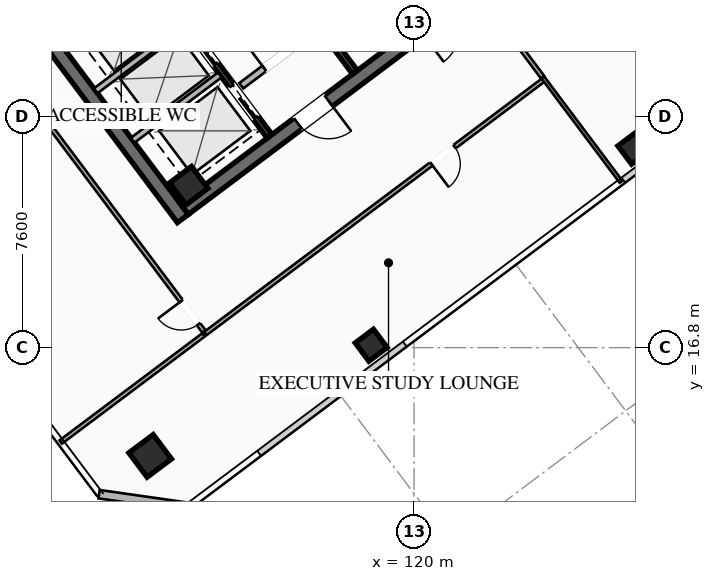
"""IFC4 building model, lengths in metres.
Left out: names, types, materials, properties, quantities, classifications, styles, units other than length and angle.
Written with IfcOpenShell. Run it as: python <this file> out.ifc"""

import sys

from ifc_helpers import new_model, si_unit, direction, frame, frame_2d, origin, origin_2d, place, context, subcontext, project, spatial, rectangle, hollow_rectangle, extrude, element, fill, save


model = new_model("IFC4")
c1 = context("Model", 3, precision=1e-05, world=origin(), true_north=direction((0.0, 1.0)))
c2 = subcontext(c1, "Body", "Model", "MODEL_VIEW")
j1 = project(units=[si_unit("LENGTHUNIT", "METRE"), si_unit("PLANEANGLEUNIT", "RADIAN")], contexts=[c1])
p1 = place(None, origin())
s1 = spatial("IfcSite", under=j1, at=p1, CompositionType="ELEMENT")
p2 = place(p1, origin())
s2 = spatial("IfcBuilding", under=s1, at=p2, CompositionType="ELEMENT")
p3 = place(p2, frame((0.0, 0.0, 218.4)))
s3 = spatial("IfcBuildingStorey", under=s2, at=p3, CompositionType="ELEMENT", Elevation=218.4)
p4 = place(p3, frame((112.396, 21.047, 0.0), z_axis=(0.0, 0.0, 1.0), x_axis=(-0.600005007985, 0.799996243986, 0.0)))
e1 = element("IfcWall", 1, at=p4, inside=s3, PredefinedType="SHEAR", context=c2, shape_type="SweptSolid", body=[
    extrude(rectangle(XDim=15.6, YDim=0.45, at=frame_2d((7.8, 0.0))), origin(), (0.0, 0.0, 1.0), 3.55),
])
p5 = place(p3, frame((124.649, 30.518, 0.0), z_axis=(0.0, 0.0, 1.0), x_axis=(-0.8, -0.6, 0.0)))
e2 = element("IfcWall", 2, at=p5, inside=s3, PredefinedType="SHEAR", context=c2, shape_type="SweptSolid", body=[
    extrude(rectangle(XDim=15.26, YDim=0.45, at=frame_2d((7.63, 0.0))), origin(), (0.0, 0.0, 1.0), 3.55),
])
p6 = place(p5, frame((9.33, 0.0, 0.0)))
e3 = element("IfcOpeningElement", 3, at=p6, cuts=e2, PredefinedType="OPENING", context=c2, shape_type="SweptSolid", body=[
    extrude(rectangle(XDim=1.25, YDim=2.25, at=frame_2d((0.625, 1.125))), frame((0.0, 0.235, 0.0), z_axis=(0.0, -1.0, 0.0), x_axis=(1.0, 0.0, 0.0)), (0.0, 0.0, 1.0), 0.47),
])
p7 = place(p5, frame((4.28, 0.0, 0.0)))
e4 = element("IfcOpeningElement", 4, at=p7, cuts=e2, PredefinedType="OPENING", context=c2, shape_type="SweptSolid", body=[
    extrude(rectangle(XDim=1.25, YDim=2.25, at=frame_2d((0.625, 1.125))), frame((0.0, 0.235, 0.0), z_axis=(0.0, -1.0, 0.0), x_axis=(1.0, 0.0, 0.0)), (0.0, 0.0, 1.0), 0.47),
])
p8 = place(p3, frame((112.59, 22.13, 0.0), z_axis=(0.0, 0.0, 1.0), x_axis=(0.799999996291, 0.600000004945, 0.0)))
e5 = element("IfcColumn", 5, at=p8, inside=s3, PredefinedType="COLUMN", context=c2, shape_type="SweptSolid", body=[
    extrude(hollow_rectangle(XDim=0.9, YDim=0.9, WallThickness=0.04, at=origin_2d()), origin(), (0.0, 0.0, 1.0), 3.37),
])
p9 = place(p3, frame((111.32, 13.24, 0.0), z_axis=(0.0, 0.0, 1.0), x_axis=(0.799999996291, 0.600000004945, 0.0)))
e6 = element("IfcColumn", 6, at=p9, inside=s3, PredefinedType="COLUMN", context=c2, shape_type="SweptSolid", body=[
    extrude(hollow_rectangle(XDim=1.0, YDim=1.0, WallThickness=0.04, at=origin_2d()), origin(), (0.0, 0.0, 1.0), 3.37),
])
for number, where, z_axis, x_axis in (
    (7, (118.59, 16.88, 0.0), (0.0, 0.0, 1.0), (0.8, 0.6, 0.0)),
    (8, (127.23, 23.36, 0.0), (0.0, 0.0, 1.0), (0.8, 0.6, 0.0)),
):
    element("IfcColumn", number, at=place(p3, frame(where, z_axis=z_axis, x_axis=x_axis)), inside=s3, PredefinedType="COLUMN", context=c2, shape_type="SweptSolid", body=[
        extrude(hollow_rectangle(XDim=0.75, YDim=0.75, WallThickness=0.032, at=origin_2d()), origin(), (0.0, 0.0, 1.0), 3.37),
    ])
p10 = place(p3, frame((112.58, 11.56, 0.0), z_axis=(0.0, 0.0, 1.0), x_axis=(-0.989954425158, 0.14138683146, 0.0)))
e9 = element("IfcWall", 9, at=p10, inside=s3, PredefinedType="SOLIDWALL", context=c2, shape_type="SweptSolid", body=[
    extrude(rectangle(XDim=2.97, YDim=0.28, at=frame_2d((1.485, 0.0))), origin(), (0.0, 0.0, 1.0), 3.37),
])
p11 = place(p3, frame((118.058, 25.856, 0.0), z_axis=(0.0, 0.0, 1.0), x_axis=(-0.600002657301, 0.799998007018, 0.0)))
e10 = element("IfcWall", 10, at=p11, inside=s3, PredefinedType="SHEAR", context=c2, shape_type="SweptSolid", body=[
    extrude(rectangle(XDim=14.7, YDim=0.2, at=frame_2d((7.35, 0.0))), origin(), (0.0, 0.0, 1.0), 3.37),
])
p12 = place(p3, frame((114.316, 25.412, 0.0), z_axis=(0.0, 0.0, 1.0), x_axis=(0.800018601094, 0.59997519774, 0.0)))
e11 = element("IfcWall", 11, at=p12, inside=s3, PredefinedType="SOLIDWALL", context=c2, shape_type="SweptSolid", body=[
    extrude(rectangle(XDim=3.15, YDim=0.22, at=frame_2d((1.575, 0.0))), origin(), (0.0, 0.0, 1.0), 2.723),
])
p13 = place(p12, frame((0.95, 0.0, 0.0)))
e12 = element("IfcOpeningElement", 12, at=p13, cuts=e11, PredefinedType="OPENING", context=c2, shape_type="SweptSolid", body=[
    extrude(rectangle(XDim=1.25, YDim=2.25, at=frame_2d((0.625, 1.125))), frame((0.0, 0.12, 0.0), z_axis=(0.0, -1.0, 0.0), x_axis=(1.0, 0.0, 0.0)), (0.0, 0.0, 1.0), 0.24),
])
p14 = place(p3, frame((115.25, 23.75, 0.0), z_axis=(0.0, 0.0, 1.0), x_axis=(-0.599994036198, 0.800004472816, 0.0)))
e13 = element("IfcWall", 13, at=p14, inside=s3, PredefinedType="SHEAR", context=c2, shape_type="SweptSolid", body=[
    extrude(rectangle(XDim=6.55, YDim=0.2, at=frame_2d((3.275, 0.0))), origin(), (0.0, 0.0, 1.0), 3.37),
])
p15 = place(p14, frame((4.975, 0.0, 0.0)))
e14 = element("IfcOpeningElement", 14, at=p15, cuts=e13, PredefinedType="OPENING", context=c2, shape_type="SweptSolid", body=[
    extrude(rectangle(XDim=1.3, YDim=2.25, at=frame_2d((0.65, 1.125))), frame((0.0, 0.11, 0.0), z_axis=(0.0, -1.0, 0.0), x_axis=(1.0, 0.0, 0.0)), (0.0, 0.0, 1.0), 0.22),
])
p16 = place(p14, frame((2.975, 0.0, 0.0)))
e15 = element("IfcOpeningElement", 15, at=p16, cuts=e13, PredefinedType="OPENING", context=c2, shape_type="SweptSolid", body=[
    extrude(rectangle(XDim=1.3, YDim=2.25, at=frame_2d((0.65, 1.125))), frame((0.0, 0.11, 0.0), z_axis=(0.0, -1.0, 0.0), x_axis=(1.0, 0.0, 0.0)), (0.0, 0.0, 1.0), 0.22),
])
p17 = place(p14, frame((0.775, 0.0, 0.0)))
e16 = element("IfcOpeningElement", 16, at=p17, cuts=e13, PredefinedType="OPENING", context=c2, shape_type="SweptSolid", body=[
    extrude(rectangle(XDim=1.3, YDim=2.25, at=frame_2d((0.65, 1.125))), frame((0.0, 0.11, 0.0), z_axis=(0.0, -1.0, 0.0), x_axis=(1.0, 0.0, 0.0)), (0.0, 0.0, 1.0), 0.22),
])
for number, where, z_axis, x_axis in (
    (17, (110.746, 23.622, 0.0), (0.0, 0.0, 1.0), (0.8, 0.6, 0.0)),
    (18, (109.528, 25.246, 0.0), (0.0, 0.0, 1.0), (0.8, 0.6, 0.0)),
):
    element("IfcWall", number, at=place(p3, frame(where, z_axis=z_axis, x_axis=x_axis)), inside=s3, PredefinedType="SOLIDWALL", context=c2, shape_type="SweptSolid", body=[
        extrude(rectangle(XDim=3.58, YDim=0.2, at=frame_2d((1.79, 0.0))), origin(), (0.0, 0.0, 1.0), 3.37),
    ])
p18 = place(p3, frame((124.282, 25.624, 0.0), z_axis=(0.0, 0.0, 1.0), x_axis=(-0.800004206286, -0.599994391578, 0.0)))
e19 = element("IfcWall", 19, at=p18, inside=s3, PredefinedType="PARTITIONING", context=c2, shape_type="SweptSolid", body=[
    extrude(rectangle(XDim=13.93, YDim=0.135, at=frame_2d((6.965, 0.0))), origin(), (0.0, 0.0, 1.0), 2.723),
])
p19 = place(p18, frame((3.69, 0.0, 0.0)))
e20 = element("IfcOpeningElement", 20, at=p19, cuts=e19, PredefinedType="OPENING", context=c2, shape_type="SweptSolid", body=[
    extrude(rectangle(XDim=0.95, YDim=2.05, at=frame_2d((0.475, 1.025))), frame((0.0, 0.077, 0.0), z_axis=(0.0, -1.0, 0.0), x_axis=(1.0, 0.0, 0.0)), (0.0, 0.0, 1.0), 0.155),
])
p20 = place(p3, frame((122.248, 28.336, 0.0), z_axis=(0.0, 0.0, 1.0), x_axis=(0.599976396045, -0.800017702422, 0.0)))
e21 = element("IfcWall", 21, at=p20, inside=s3, PredefinedType="PARTITIONING", context=c2, shape_type="SweptSolid", body=[
    extrude(rectangle(XDim=3.31, YDim=0.135, at=frame_2d((1.655, 0.0))), origin(), (0.0, 0.0, 1.0), 2.723),
])
p21 = place(p20, frame((0.25, 0.0, 0.0)))
e22 = element("IfcOpeningElement", 22, at=p21, cuts=e21, PredefinedType="OPENING", context=c2, shape_type="SweptSolid", body=[
    extrude(rectangle(XDim=0.95, YDim=2.05, at=frame_2d((0.475, 1.025))), frame((0.0, 0.077, 0.0), z_axis=(0.0, -1.0, 0.0), x_axis=(1.0, 0.0, 0.0)), (0.0, 0.0, 1.0), 0.155),
])
p22 = place(p3, frame((126.808, 22.256, 0.0), z_axis=(0.0, 0.0, 1.0), x_axis=(-0.600045526003, 0.799965853474, 0.0)))
e23 = element("IfcWall", 23, at=p22, inside=s3, PredefinedType="PARTITIONING", context=c2, shape_type="SweptSolid", body=[
    extrude(rectangle(XDim=4.29, YDim=0.11, at=frame_2d((2.145, 0.0))), origin(), (0.0, 0.0, 1.0), 2.723),
])
p23 = place(p3, frame((113.09, 17.33, 0.0), z_axis=(0.0, 0.0, 1.0), x_axis=(-0.60000575578, 0.799995683132, 0.0)))
e24 = element("IfcWall", 24, at=p23, inside=s3, PredefinedType="PARTITIONING", context=c2, shape_type="SweptSolid", body=[
    extrude(rectangle(XDim=20.36, YDim=0.135, at=frame_2d((10.18, 0.0))), origin(), (0.0, 0.0, 1.0), 2.723),
])
p24 = place(p23, frame((0.3, 0.0, 0.0)))
e25 = element("IfcOpeningElement", 25, at=p24, cuts=e24, PredefinedType="OPENING", context=c2, shape_type="SweptSolid", body=[
    extrude(rectangle(XDim=0.95, YDim=2.05, at=frame_2d((0.475, 1.025))), frame((0.0, 0.077, 0.0), z_axis=(0.0, -1.0, 0.0), x_axis=(1.0, 0.0, 0.0)), (0.0, 0.0, 1.0), 0.155),
])
p25 = place(p3, frame((108.378, 13.696, 0.0), z_axis=(0.0, 0.0, 1.0), x_axis=(0.800004990905, 0.599993345402, 0.0)))
e26 = element("IfcWall", 26, at=p25, inside=s3, PredefinedType="PARTITIONING", context=c2, shape_type="SweptSolid", body=[
    extrude(rectangle(XDim=5.87, YDim=0.135, at=frame_2d((2.935, 0.0))), origin(), (0.0, 0.0, 1.0), 2.723),
])
p26 = place(p6, origin())
e27 = element("IfcDoor", 27, at=p26, inside=s3, OperationType="SINGLE_SWING_LEFT", PredefinedType="DOOR", context=c2, shape_type="SweptSolid", body=[
    extrude(rectangle(XDim=1.25, YDim=2.25, at=frame_2d((0.625, 1.125))), frame((0.0, 0.025, 0.0), z_axis=(0.0, -1.0, 0.0), x_axis=(1.0, 0.0, 0.0)), (0.0, 0.0, 1.0), 0.05),
])
fill(e3, e27)
p27 = place(p13, origin())
e28 = element("IfcDoor", 28, at=p27, inside=s3, OperationType="SINGLE_SWING_LEFT", PredefinedType="DOOR", context=c2, shape_type="SweptSolid", body=[
    extrude(rectangle(XDim=1.25, YDim=2.25, at=frame_2d((0.625, 1.125))), frame((0.0, 0.025, 0.0), z_axis=(0.0, -1.0, 0.0), x_axis=(1.0, 0.0, 0.0)), (0.0, 0.0, 1.0), 0.05),
])
fill(e12, e28)
p28 = place(p19, origin())
e29 = element("IfcDoor", 29, at=p28, inside=s3, OperationType="SINGLE_SWING_RIGHT", PredefinedType="DOOR", context=c2, shape_type="SweptSolid", body=[
    extrude(rectangle(XDim=0.95, YDim=2.05, at=frame_2d((0.475, 1.025))), frame((0.0, 0.025, 0.0), z_axis=(0.0, -1.0, 0.0), x_axis=(1.0, 0.0, 0.0)), (0.0, 0.0, 1.0), 0.05),
])
fill(e20, e29)
p29 = place(p24, origin())
e30 = element("IfcDoor", 30, at=p29, inside=s3, OperationType="SINGLE_SWING_RIGHT", PredefinedType="DOOR", context=c2, shape_type="SweptSolid", body=[
    extrude(rectangle(XDim=0.95, YDim=2.05, at=frame_2d((0.475, 1.025))), frame((0.0, 0.025, 0.0), z_axis=(0.0, -1.0, 0.0), x_axis=(1.0, 0.0, 0.0)), (0.0, 0.0, 1.0), 0.05),
])
fill(e25, e30)
p30 = place(p16, origin())
e31 = element("IfcDoor", 31, at=p30, inside=s3, OperationType="SLIDING_TO_LEFT", PredefinedType="DOOR", context=c2, shape_type="SweptSolid", body=[
    extrude(rectangle(XDim=1.3, YDim=2.25, at=frame_2d((0.65, 1.125))), frame((0.0, 0.025, 0.0), z_axis=(0.0, -1.0, 0.0), x_axis=(1.0, 0.0, 0.0)), (0.0, 0.0, 1.0), 0.05),
])
fill(e15, e31)
p31 = place(p17, origin())
e32 = element("IfcDoor", 32, at=p31, inside=s3, OperationType="SLIDING_TO_LEFT", PredefinedType="DOOR", context=c2, shape_type="SweptSolid", body=[
    extrude(rectangle(XDim=1.3, YDim=2.25, at=frame_2d((0.65, 1.125))), frame((0.0, 0.025, 0.0), z_axis=(0.0, -1.0, 0.0), x_axis=(1.0, 0.0, 0.0)), (0.0, 0.0, 1.0), 0.05),
])
fill(e16, e32)
save(model, sys.argv[1])
